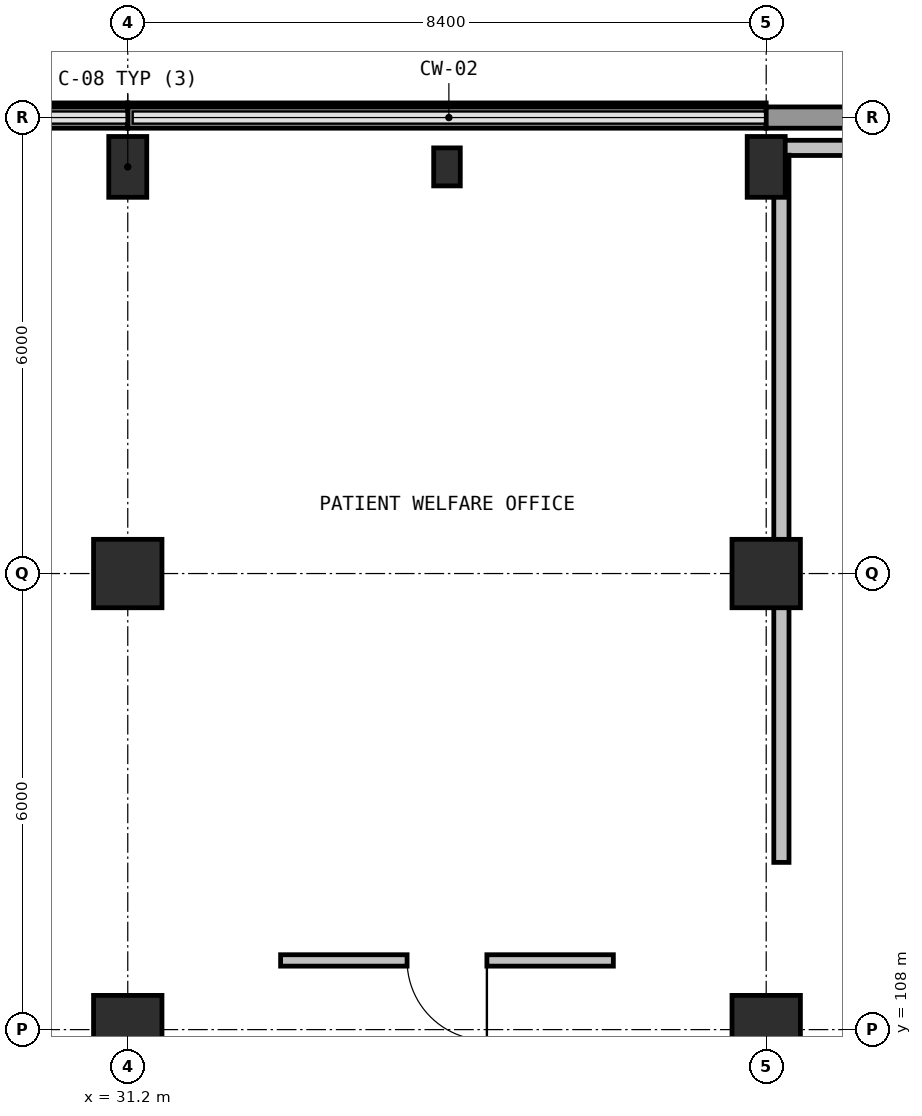
"""IFC4 building model, lengths in metres.
Left out: names, types, materials, properties, quantities, classifications, styles, units other than length and angle.
Written with IfcOpenShell. Run it as: python <this file> out.ifc"""

import sys

from ifc_helpers import new_model, si_unit, direction, frame, frame_2d, origin, origin_2d, place, context, subcontext, project, spatial, rectangle, extrude, element, fill, save


model = new_model("IFC4")
c1 = context("Model", 3, precision=1e-05, world=origin(), true_north=direction((0.0, 1.0)))
c2 = subcontext(c1, "Body", "Model", "MODEL_VIEW")
j1 = project(units=[si_unit("LENGTHUNIT", "METRE"), si_unit("PLANEANGLEUNIT", "RADIAN")], contexts=[c1])
p1 = place(None, origin())
s1 = spatial("IfcSite", under=j1, at=p1, CompositionType="ELEMENT")
p2 = place(p1, origin())
s2 = spatial("IfcBuilding", under=s1, at=p2, CompositionType="ELEMENT")
p3 = place(p2, origin())
s3 = spatial("IfcBuildingStorey", under=s2, at=p3, CompositionType="ELEMENT", Elevation=0.0)
for number, where, z_axis, x_axis in (
    (1, (31.2, 108.0, 0.0), (0.0, 0.0, 1.0), (1.0, 0.0, 0.0)),
    (2, (31.2, 114.0, 0.0), (0.0, 0.0, 1.0), (1.0, 0.0, 0.0)),
):
    element("IfcColumn", number, at=place(p3, frame(where, z_axis=z_axis, x_axis=x_axis)), inside=s3, PredefinedType="COLUMN", context=c2, shape_type="SweptSolid", body=[
        extrude(rectangle(XDim=0.9, YDim=0.9, at=origin_2d()), origin(), (0.0, 0.0, 1.0), 5.4),
    ])
p4 = place(p3, frame((31.2, 119.35, 0.0), z_axis=(0.0, 0.0, 1.0), x_axis=(1.0, 0.0, 0.0)))
e3 = element("IfcColumn", 3, at=p4, inside=s3, PredefinedType="COLUMN", context=c2, shape_type="SweptSolid", body=[
    extrude(rectangle(XDim=0.5, YDim=0.8, at=origin_2d()), origin(), (0.0, 0.0, 1.0), 5.4),
])
for number, where, z_axis, x_axis in (
    (4, (39.6, 108.0, 0.0), (0.0, 0.0, 1.0), (1.0, 0.0, 0.0)),
    (5, (39.6, 114.0, 0.0), (0.0, 0.0, 1.0), (1.0, 0.0, 0.0)),
):
    element("IfcColumn", number, at=place(p3, frame(where, z_axis=z_axis, x_axis=x_axis)), inside=s3, PredefinedType="COLUMN", context=c2, shape_type="SweptSolid", body=[
        extrude(rectangle(XDim=0.9, YDim=0.9, at=origin_2d()), origin(), (0.0, 0.0, 1.0), 5.4),
    ])
p5 = place(p3, frame((39.6, 119.35, 0.0), z_axis=(0.0, 0.0, 1.0), x_axis=(1.0, 0.0, 0.0)))
e6 = element("IfcColumn", 6, at=p5, inside=s3, PredefinedType="COLUMN", context=c2, shape_type="SweptSolid", body=[
    extrude(rectangle(XDim=0.5, YDim=0.8, at=origin_2d()), origin(), (0.0, 0.0, 1.0), 5.4),
])
p6 = place(p3, frame((35.4, 119.35, 0.0), z_axis=(0.0, 0.0, 1.0), x_axis=(1.0, 0.0, 0.0)))
e7 = element("IfcColumn", 7, at=p6, inside=s3, PredefinedType="PILASTER", context=c2, shape_type="SweptSolid", body=[
    extrude(rectangle(XDim=0.35, YDim=0.5, at=origin_2d()), origin(), (0.0, 0.0, 1.0), 5.4),
])
for number, where, z_axis, x_axis in (
    (8, (22.802, 119.999, 0.0), (0.0, 0.0, 1.0), (1.0, 0.0, 0.0)),
    (9, (31.202, 119.999, 0.0), (0.0, 0.0, 1.0), (1.0, 0.0, 0.0)),
):
    element("IfcWall", number, at=place(p3, frame(where, z_axis=z_axis, x_axis=x_axis)), inside=s3, PredefinedType="SOLIDWALL", context=c2, shape_type="SweptSolid", body=[
        extrude(rectangle(XDim=8.396, YDim=0.28, at=frame_2d((4.198, 0.0))), origin(), (0.0, 0.0, 1.0), 0.94),
    ])
p7 = place(p3, frame((39.6, 119.999, 0.0), z_axis=(0.0, 0.0, 1.0), x_axis=(1.0, 0.0, 0.0)))
e10 = element("IfcWall", 10, at=p7, inside=s3, PredefinedType="SOLIDWALL", context=c2, shape_type="SweptSolid", body=[
    extrude(rectangle(XDim=8.4, YDim=0.28, at=frame_2d((4.2, 0.0))), origin(), (0.0, 0.0, 1.0), 5.08),
])
p8 = place(p7, frame((6.1, 0.0, 0.0)))
e11 = element("IfcOpeningElement", 11, at=p8, cuts=e10, PredefinedType="OPENING", context=c2, shape_type="SweptSolid", body=[
    extrude(rectangle(XDim=2.0, YDim=2.3, at=frame_2d((1.0, 1.15))), frame((0.0, 0.15, 0.0), z_axis=(0.0, -1.0, 0.0), x_axis=(1.0, 0.0, 0.0)), (0.0, 0.0, 1.0), 0.3),
])
p9 = place(p3, frame((39.761, 119.6, 0.0), z_axis=(0.0, 0.0, 1.0), x_axis=(1.0, 0.0, 0.0)))
e12 = element("IfcWall", 12, at=p9, inside=s3, PredefinedType="SOLIDWALL", context=c2, shape_type="SweptSolid", body=[
    extrude(rectangle(XDim=5.546, YDim=0.2, at=frame_2d((2.773, 0.0))), origin(), (0.0, 0.0, 1.0), 5.08),
])
p10 = place(p3, frame((39.8, 110.2, 0.0), z_axis=(0.0, 0.0, 1.0), x_axis=(0.0, 1.0, 0.0)))
e13 = element("IfcWall", 13, at=p10, inside=s3, PredefinedType="SOLIDWALL", context=c2, shape_type="SweptSolid", body=[
    extrude(rectangle(XDim=9.304, YDim=0.2, at=frame_2d((4.652, 0.0))), origin(), (0.0, 0.0, 1.0), 4.33),
])
p11 = place(p3, frame((37.589, 108.91, 0.0), z_axis=(0.0, 0.0, 1.0), x_axis=(-1.0, 0.0, 0.0)))
e14 = element("IfcWall", 14, at=p11, inside=s3, PredefinedType="PARTITIONING", context=c2, shape_type="SweptSolid", body=[
    extrude(rectangle(XDim=4.378, YDim=0.15, at=frame_2d((2.189, 0.0))), origin(), (0.0, 0.0, 1.0), 5.08),
])
p12 = place(p11, frame((1.664, 0.0, 0.0)))
e15 = element("IfcOpeningElement", 15, at=p12, cuts=e14, PredefinedType="OPENING", context=c2, shape_type="SweptSolid", body=[
    extrude(rectangle(XDim=1.05, YDim=2.15, at=frame_2d((0.525, 1.075))), frame((0.0, 0.085, 0.0), z_axis=(0.0, -1.0, 0.0), x_axis=(1.0, 0.0, 0.0)), (0.0, 0.0, 1.0), 0.17),
])
p13 = place(p12, origin())
e16 = element("IfcDoor", 16, at=p13, inside=s3, OperationType="SINGLE_SWING_RIGHT", PredefinedType="DOOR", context=c2, shape_type="SweptSolid", body=[
    extrude(rectangle(XDim=1.05, YDim=2.15, at=frame_2d((0.525, 1.075))), frame((0.0, 0.025, 0.0), z_axis=(0.0, -1.0, 0.0), x_axis=(1.0, 0.0, 0.0)), (0.0, 0.0, 1.0), 0.05),
])
fill(e15, e16)
save(model, sys.argv[1])
